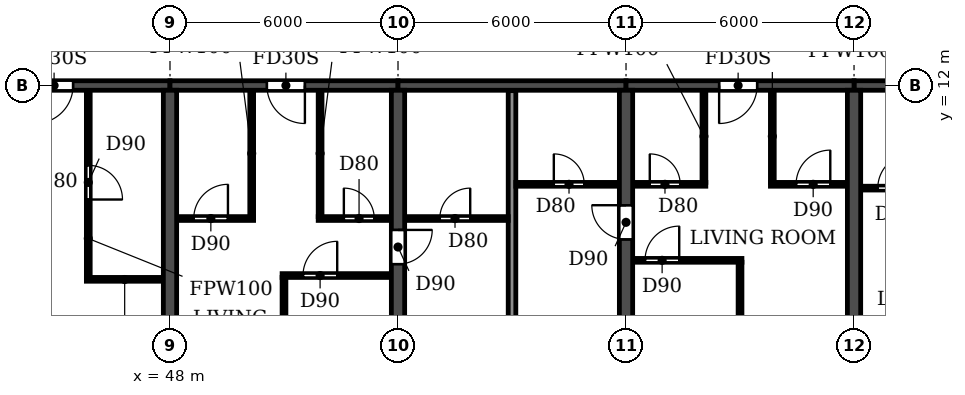
"""IFC4 building model, lengths in metres.
Left out: names, types, materials, properties, quantities, classifications, styles, units other than length and angle.
Written with IfcOpenShell. Run it as: python <this file> out.ifc"""

import sys

from ifc_helpers import new_model, si_unit, direction, frame, frame_2d, origin, place, context, subcontext, project, spatial, rectangle, extrude, element, fill, save


model = new_model("IFC4")
c1 = context("Model", 3, precision=1e-05, world=origin(), true_north=direction((0.0, 1.0)))
c2 = subcontext(c1, "Body", "Model", "MODEL_VIEW")
j1 = project(units=[si_unit("LENGTHUNIT", "METRE"), si_unit("PLANEANGLEUNIT", "RADIAN")], contexts=[c1])
p1 = place(None, origin())
s1 = spatial("IfcSite", under=j1, at=p1, CompositionType="ELEMENT")
p2 = place(p1, origin())
s2 = spatial("IfcBuilding", under=s1, at=p2, CompositionType="ELEMENT")
p3 = place(p2, frame((0.0, 0.0, 109.2)))
s3 = spatial("IfcBuildingStorey", under=s2, at=p3, CompositionType="ELEMENT", Elevation=109.2)
p4 = place(p3, frame((48.0, 0.2, 0.0), z_axis=(0.0, 0.0, 1.0), x_axis=(0.0, 1.0, 0.0)))
e1 = element("IfcWall", 1, at=p4, inside=s3, PredefinedType="SHEAR", context=c2, shape_type="SweptSolid", body=[
    extrude(rectangle(XDim=11.675, YDim=0.35, at=frame_2d((5.837, 0.0))), origin(), (0.0, 0.0, 1.0), 3.06),
])
p5 = place(p3, frame((54.0, 0.2, 0.0), z_axis=(0.0, 0.0, 1.0), x_axis=(0.0, 1.0, 0.0)))
e2 = element("IfcWall", 2, at=p5, inside=s3, PredefinedType="SHEAR", context=c2, shape_type="SweptSolid", body=[
    extrude(rectangle(XDim=11.675, YDim=0.35, at=frame_2d((5.837, 0.0))), origin(), (0.0, 0.0, 1.0), 3.06),
])
p6 = place(p5, frame((7.1, 0.0, 0.0)))
e3 = element("IfcOpeningElement", 3, at=p6, cuts=e2, PredefinedType="OPENING", context=c2, shape_type="SweptSolid", body=[
    extrude(rectangle(XDim=0.9, YDim=2.1, at=frame_2d((0.45, 1.05))), frame((0.0, 0.185, 0.0), z_axis=(0.0, -1.0, 0.0), x_axis=(1.0, 0.0, 0.0)), (0.0, 0.0, 1.0), 0.37),
])
p7 = place(p3, frame((60.0, 0.2, 0.0), z_axis=(0.0, 0.0, 1.0), x_axis=(0.0, 1.0, 0.0)))
e4 = element("IfcWall", 4, at=p7, inside=s3, PredefinedType="SHEAR", context=c2, shape_type="SweptSolid", body=[
    extrude(rectangle(XDim=11.675, YDim=0.35, at=frame_2d((5.837, 0.0))), origin(), (0.0, 0.0, 1.0), 3.06),
])
p8 = place(p7, frame((7.75, 0.0, 0.0)))
e5 = element("IfcOpeningElement", 5, at=p8, cuts=e4, PredefinedType="OPENING", context=c2, shape_type="SweptSolid", body=[
    extrude(rectangle(XDim=0.9, YDim=2.1, at=frame_2d((0.45, 1.05))), frame((0.0, 0.185, 0.0), z_axis=(0.0, -1.0, 0.0), x_axis=(1.0, 0.0, 0.0)), (0.0, 0.0, 1.0), 0.37),
])
p9 = place(p3, frame((66.0, 0.2, 0.0), z_axis=(0.0, 0.0, 1.0), x_axis=(0.0, 1.0, 0.0)))
e6 = element("IfcWall", 6, at=p9, inside=s3, PredefinedType="SHEAR", context=c2, shape_type="SweptSolid", body=[
    extrude(rectangle(XDim=11.675, YDim=0.35, at=frame_2d((5.837, 0.0))), origin(), (0.0, 0.0, 1.0), 3.06),
])
p10 = place(p3, frame((42.0, 12.0, 0.0), z_axis=(0.0, 0.0, 1.0), x_axis=(1.0, 0.0, 0.0)))
e7 = element("IfcWall", 7, at=p10, inside=s3, PredefinedType="SHEAR", context=c2, shape_type="SweptSolid", body=[
    extrude(rectangle(XDim=6.0, YDim=0.25, at=frame_2d((3.0, 0.0))), origin(), (0.0, 0.0, 1.0), 2.46),
])
p11 = place(p10, frame((2.45, 0.0, 0.0)))
e8 = element("IfcOpeningElement", 8, at=p11, cuts=e7, PredefinedType="OPENING", context=c2, shape_type="SweptSolid", body=[
    extrude(rectangle(XDim=1.0, YDim=2.1, at=frame_2d((0.5, 1.05))), frame((0.0, 0.135, 0.0), z_axis=(0.0, -1.0, 0.0), x_axis=(1.0, 0.0, 0.0)), (0.0, 0.0, 1.0), 0.27),
])
p12 = place(p3, frame((48.0, 12.0, 0.0), z_axis=(0.0, 0.0, 1.0), x_axis=(1.0, 0.0, 0.0)))
e9 = element("IfcWall", 9, at=p12, inside=s3, PredefinedType="SHEAR", context=c2, shape_type="SweptSolid", body=[
    extrude(rectangle(XDim=6.0, YDim=0.25, at=frame_2d((3.0, 0.0))), origin(), (0.0, 0.0, 1.0), 2.46),
])
p13 = place(p12, frame((2.55, 0.0, 0.0)))
e10 = element("IfcOpeningElement", 10, at=p13, cuts=e9, PredefinedType="OPENING", context=c2, shape_type="SweptSolid", body=[
    extrude(rectangle(XDim=1.0, YDim=2.1, at=frame_2d((0.5, 1.05))), frame((0.0, 0.135, 0.0), z_axis=(0.0, -1.0, 0.0), x_axis=(1.0, 0.0, 0.0)), (0.0, 0.0, 1.0), 0.27),
])
p14 = place(p3, frame((54.0, 12.0, 0.0), z_axis=(0.0, 0.0, 1.0), x_axis=(1.0, 0.0, 0.0)))
e11 = element("IfcWall", 11, at=p14, inside=s3, PredefinedType="SHEAR", context=c2, shape_type="SweptSolid", body=[
    extrude(rectangle(XDim=6.0, YDim=0.25, at=frame_2d((3.0, 0.0))), origin(), (0.0, 0.0, 1.0), 2.46),
])
p15 = place(p3, frame((60.0, 12.0, 0.0), z_axis=(0.0, 0.0, 1.0), x_axis=(1.0, 0.0, 0.0)))
e12 = element("IfcWall", 12, at=p15, inside=s3, PredefinedType="SHEAR", context=c2, shape_type="SweptSolid", body=[
    extrude(rectangle(XDim=6.0, YDim=0.25, at=frame_2d((3.0, 0.0))), origin(), (0.0, 0.0, 1.0), 2.46),
])
p16 = place(p15, frame((2.45, 0.0, 0.0)))
e13 = element("IfcOpeningElement", 13, at=p16, cuts=e12, PredefinedType="OPENING", context=c2, shape_type="SweptSolid", body=[
    extrude(rectangle(XDim=1.0, YDim=2.1, at=frame_2d((0.5, 1.05))), frame((0.0, 0.135, 0.0), z_axis=(0.0, -1.0, 0.0), x_axis=(1.0, 0.0, 0.0)), (0.0, 0.0, 1.0), 0.27),
])
p17 = place(p3, frame((66.0, 12.0, 0.0), z_axis=(0.0, 0.0, 1.0), x_axis=(1.0, 0.0, 0.0)))
e14 = element("IfcWall", 14, at=p17, inside=s3, PredefinedType="SHEAR", context=c2, shape_type="SweptSolid", body=[
    extrude(rectangle(XDim=6.0, YDim=0.25, at=frame_2d((3.0, 0.0))), origin(), (0.0, 0.0, 1.0), 2.46),
])
p18 = place(p17, frame((2.55, 0.0, 0.0)))
e15 = element("IfcOpeningElement", 15, at=p18, cuts=e14, PredefinedType="OPENING", context=c2, shape_type="SweptSolid", body=[
    extrude(rectangle(XDim=1.0, YDim=2.1, at=frame_2d((0.5, 1.05))), frame((0.0, 0.135, 0.0), z_axis=(0.0, -1.0, 0.0), x_axis=(1.0, 0.0, 0.0)), (0.0, 0.0, 1.0), 0.27),
])
p19 = place(p3, frame((57.0, 0.06, 0.0), z_axis=(0.0, 0.0, 1.0), x_axis=(0.0, 1.0, 0.0)))
e16 = element("IfcWall", 16, at=p19, inside=s3, PredefinedType="PARTITIONING", context=c2, shape_type="SweptSolid", body=[
    extrude(rectangle(XDim=11.805, YDim=0.2, at=frame_2d((5.902, 0.0))), origin(), (0.0, 0.0, 1.0), 3.06),
])
p20 = place(p3, frame((45.8, 6.9, 0.0), z_axis=(0.0, 0.0, 1.0), x_axis=(1.0, 0.0, 0.0)))
e17 = element("IfcWall", 17, at=p20, inside=s3, PredefinedType="PARTITIONING", context=c2, shape_type="SweptSolid", body=[
    extrude(rectangle(XDim=2.015, YDim=0.1, at=frame_2d((1.007, 0.0))), origin(), (0.0, 0.0, 1.0), 3.06),
])
p21 = place(p3, frame((50.95, 7.0, 0.0), z_axis=(0.0, 0.0, 1.0), x_axis=(1.0, 0.0, 0.0)))
e18 = element("IfcWall", 18, at=p21, inside=s3, PredefinedType="PARTITIONING", context=c2, shape_type="SweptSolid", body=[
    extrude(rectangle(XDim=2.865, YDim=0.1, at=frame_2d((1.433, 0.0))), origin(), (0.0, 0.0, 1.0), 3.06),
])
p22 = place(p21, frame((0.55, 0.0, 0.0)))
e19 = element("IfcOpeningElement", 19, at=p22, cuts=e18, PredefinedType="OPENING", context=c2, shape_type="SweptSolid", body=[
    extrude(rectangle(XDim=0.9, YDim=2.1, at=frame_2d((0.45, 1.05))), frame((0.0, 0.06, 0.0), z_axis=(0.0, -1.0, 0.0), x_axis=(1.0, 0.0, 0.0)), (0.0, 0.0, 1.0), 0.12),
])
p23 = place(p3, frame((60.185, 7.4, 0.0), z_axis=(0.0, 0.0, 1.0), x_axis=(1.0, 0.0, 0.0)))
e20 = element("IfcWall", 20, at=p23, inside=s3, PredefinedType="PARTITIONING", context=c2, shape_type="SweptSolid", body=[
    extrude(rectangle(XDim=2.865, YDim=0.1, at=frame_2d((1.433, 0.0))), origin(), (0.0, 0.0, 1.0), 3.06),
])
p24 = place(p23, frame((0.315, 0.0, 0.0)))
e21 = element("IfcOpeningElement", 21, at=p24, cuts=e20, PredefinedType="OPENING", context=c2, shape_type="SweptSolid", body=[
    extrude(rectangle(XDim=0.9, YDim=2.1, at=frame_2d((0.45, 1.05))), frame((0.0, 0.06, 0.0), z_axis=(0.0, -1.0, 0.0), x_axis=(1.0, 0.0, 0.0)), (0.0, 0.0, 1.0), 0.12),
])
p25 = place(p3, frame((48.185, 8.5, 0.0), z_axis=(0.0, 0.0, 1.0), x_axis=(1.0, 0.0, 0.0)))
e22 = element("IfcWall", 22, at=p25, inside=s3, PredefinedType="PARTITIONING", context=c2, shape_type="SweptSolid", body=[
    extrude(rectangle(XDim=2.015, YDim=0.1, at=frame_2d((1.007, 0.0))), origin(), (0.0, 0.0, 1.0), 3.06),
])
p26 = place(p25, frame((0.44, 0.0, 0.0)))
e23 = element("IfcOpeningElement", 23, at=p26, cuts=e22, PredefinedType="OPENING", context=c2, shape_type="SweptSolid", body=[
    extrude(rectangle(XDim=0.9, YDim=2.1, at=frame_2d((0.45, 1.05))), frame((0.0, 0.06, 0.0), z_axis=(0.0, -1.0, 0.0), x_axis=(1.0, 0.0, 0.0)), (0.0, 0.0, 1.0), 0.12),
])
p27 = place(p3, frame((51.9, 8.5, 0.0), z_axis=(0.0, 0.0, 1.0), x_axis=(1.0, 0.0, 0.0)))
e24 = element("IfcWall", 24, at=p27, inside=s3, PredefinedType="PARTITIONING", context=c2, shape_type="SweptSolid", body=[
    extrude(rectangle(XDim=1.915, YDim=0.1, at=frame_2d((0.958, 0.0))), origin(), (0.0, 0.0, 1.0), 3.06),
])
p28 = place(p27, frame((0.675, 0.0, 0.0)))
e25 = element("IfcOpeningElement", 25, at=p28, cuts=e24, PredefinedType="OPENING", context=c2, shape_type="SweptSolid", body=[
    extrude(rectangle(XDim=0.8, YDim=2.1, at=frame_2d((0.4, 1.05))), frame((0.0, 0.06, 0.0), z_axis=(0.0, -1.0, 0.0), x_axis=(1.0, 0.0, 0.0)), (0.0, 0.0, 1.0), 0.12),
])
p29 = place(p3, frame((54.185, 8.5, 0.0), z_axis=(0.0, 0.0, 1.0), x_axis=(1.0, 0.0, 0.0)))
e26 = element("IfcWall", 26, at=p29, inside=s3, PredefinedType="PARTITIONING", context=c2, shape_type="SweptSolid", body=[
    extrude(rectangle(XDim=2.715, YDim=0.1, at=frame_2d((1.357, 0.0))), origin(), (0.0, 0.0, 1.0), 3.06),
])
p30 = place(p29, frame((0.915, 0.0, 0.0)))
e27 = element("IfcOpeningElement", 27, at=p30, cuts=e26, PredefinedType="OPENING", context=c2, shape_type="SweptSolid", body=[
    extrude(rectangle(XDim=0.8, YDim=2.1, at=frame_2d((0.4, 1.05))), frame((0.0, 0.06, 0.0), z_axis=(0.0, -1.0, 0.0), x_axis=(1.0, 0.0, 0.0)), (0.0, 0.0, 1.0), 0.12),
])
p31 = place(p3, frame((66.185, 9.3, 0.0), z_axis=(0.0, 0.0, 1.0), x_axis=(1.0, 0.0, 0.0)))
e28 = element("IfcWall", 28, at=p31, inside=s3, PredefinedType="PARTITIONING", context=c2, shape_type="SweptSolid", body=[
    extrude(rectangle(XDim=2.015, YDim=0.1, at=frame_2d((1.007, 0.0))), origin(), (0.0, 0.0, 1.0), 3.06),
])
p32 = place(p31, frame((0.44, 0.0, 0.0)))
e29 = element("IfcOpeningElement", 29, at=p32, cuts=e28, PredefinedType="OPENING", context=c2, shape_type="SweptSolid", body=[
    extrude(rectangle(XDim=0.9, YDim=2.1, at=frame_2d((0.45, 1.05))), frame((0.0, 0.06, 0.0), z_axis=(0.0, -1.0, 0.0), x_axis=(1.0, 0.0, 0.0)), (0.0, 0.0, 1.0), 0.12),
])
p33 = place(p3, frame((57.1, 9.4, 0.0), z_axis=(0.0, 0.0, 1.0), x_axis=(1.0, 0.0, 0.0)))
e30 = element("IfcWall", 30, at=p33, inside=s3, PredefinedType="PARTITIONING", context=c2, shape_type="SweptSolid", body=[
    extrude(rectangle(XDim=2.715, YDim=0.1, at=frame_2d((1.357, 0.0))), origin(), (0.0, 0.0, 1.0), 3.06),
])
p34 = place(p33, frame((1.0, 0.0, 0.0)))
e31 = element("IfcOpeningElement", 31, at=p34, cuts=e30, PredefinedType="OPENING", context=c2, shape_type="SweptSolid", body=[
    extrude(rectangle(XDim=0.8, YDim=2.1, at=frame_2d((0.4, 1.05))), frame((0.0, 0.06, 0.0), z_axis=(0.0, -1.0, 0.0), x_axis=(1.0, 0.0, 0.0)), (0.0, 0.0, 1.0), 0.12),
])
p35 = place(p3, frame((60.185, 9.4, 0.0), z_axis=(0.0, 0.0, 1.0), x_axis=(1.0, 0.0, 0.0)))
e32 = element("IfcWall", 32, at=p35, inside=s3, PredefinedType="PARTITIONING", context=c2, shape_type="SweptSolid", body=[
    extrude(rectangle(XDim=1.915, YDim=0.1, at=frame_2d((0.958, 0.0))), origin(), (0.0, 0.0, 1.0), 3.06),
])
p36 = place(p35, frame((0.44, 0.0, 0.0)))
e33 = element("IfcOpeningElement", 33, at=p36, cuts=e32, PredefinedType="OPENING", context=c2, shape_type="SweptSolid", body=[
    extrude(rectangle(XDim=0.8, YDim=2.1, at=frame_2d((0.4, 1.05))), frame((0.0, 0.06, 0.0), z_axis=(0.0, -1.0, 0.0), x_axis=(1.0, 0.0, 0.0)), (0.0, 0.0, 1.0), 0.12),
])
p37 = place(p3, frame((63.8, 9.4, 0.0), z_axis=(0.0, 0.0, 1.0), x_axis=(1.0, 0.0, 0.0)))
e34 = element("IfcWall", 34, at=p37, inside=s3, PredefinedType="PARTITIONING", context=c2, shape_type="SweptSolid", body=[
    extrude(rectangle(XDim=2.015, YDim=0.1, at=frame_2d((1.007, 0.0))), origin(), (0.0, 0.0, 1.0), 3.06),
])
p38 = place(p37, frame((0.675, 0.0, 0.0)))
e35 = element("IfcOpeningElement", 35, at=p38, cuts=e34, PredefinedType="OPENING", context=c2, shape_type="SweptSolid", body=[
    extrude(rectangle(XDim=0.9, YDim=2.1, at=frame_2d((0.45, 1.05))), frame((0.0, 0.06, 0.0), z_axis=(0.0, -1.0, 0.0), x_axis=(1.0, 0.0, 0.0)), (0.0, 0.0, 1.0), 0.12),
])
p39 = place(p3, frame((45.85, 6.95, 0.0), z_axis=(0.0, 0.0, 1.0), x_axis=(0.0, 1.0, 0.0)))
e36 = element("IfcWall", 36, at=p39, inside=s3, PredefinedType="PARTITIONING", context=c2, shape_type="SweptSolid", body=[
    extrude(rectangle(XDim=4.915, YDim=0.1, at=frame_2d((2.458, 0.0))), origin(), (0.0, 0.0, 1.0), 3.06),
])
p40 = place(p39, frame((2.05, 0.0, 0.0)))
e37 = element("IfcOpeningElement", 37, at=p40, cuts=e36, PredefinedType="OPENING", context=c2, shape_type="SweptSolid", body=[
    extrude(rectangle(XDim=0.9, YDim=2.1, at=frame_2d((0.45, 1.05))), frame((0.0, 0.06, 0.0), z_axis=(0.0, -1.0, 0.0), x_axis=(1.0, 0.0, 0.0)), (0.0, 0.0, 1.0), 0.12),
])
p41 = place(p3, frame((50.15, 8.55, 0.0), z_axis=(0.0, 0.0, 1.0), x_axis=(0.0, 1.0, 0.0)))
e38 = element("IfcWall", 38, at=p41, inside=s3, PredefinedType="PARTITIONING", context=c2, shape_type="SweptSolid", body=[
    extrude(rectangle(XDim=3.315, YDim=0.1, at=frame_2d((1.657, 0.0))), origin(), (0.0, 0.0, 1.0), 3.06),
])
p42 = place(p3, frame((51.0, 0.06, 0.0), z_axis=(0.0, 0.0, 1.0), x_axis=(0.0, 1.0, 0.0)))
e39 = element("IfcWall", 39, at=p42, inside=s3, PredefinedType="PARTITIONING", context=c2, shape_type="SweptSolid", body=[
    extrude(rectangle(XDim=6.89, YDim=0.1, at=frame_2d((3.445, 0.0))), origin(), (0.0, 0.0, 1.0), 3.06),
])
p43 = place(p3, frame((51.95, 8.55, 0.0), z_axis=(0.0, 0.0, 1.0), x_axis=(0.0, 1.0, 0.0)))
e40 = element("IfcWall", 40, at=p43, inside=s3, PredefinedType="PARTITIONING", context=c2, shape_type="SweptSolid", body=[
    extrude(rectangle(XDim=3.315, YDim=0.1, at=frame_2d((1.657, 0.0))), origin(), (0.0, 0.0, 1.0), 3.06),
])
p44 = place(p3, frame((62.05, 9.45, 0.0), z_axis=(0.0, 0.0, 1.0), x_axis=(0.0, 1.0, 0.0)))
e41 = element("IfcWall", 41, at=p44, inside=s3, PredefinedType="PARTITIONING", context=c2, shape_type="SweptSolid", body=[
    extrude(rectangle(XDim=2.415, YDim=0.1, at=frame_2d((1.208, 0.0))), origin(), (0.0, 0.0, 1.0), 3.06),
])
p45 = place(p3, frame((63.0, 0.06, 0.0), z_axis=(0.0, 0.0, 1.0), x_axis=(0.0, 1.0, 0.0)))
e42 = element("IfcWall", 42, at=p45, inside=s3, PredefinedType="PARTITIONING", context=c2, shape_type="SweptSolid", body=[
    extrude(rectangle(XDim=7.29, YDim=0.1, at=frame_2d((3.645, 0.0))), origin(), (0.0, 0.0, 1.0), 3.06),
])
p46 = place(p3, frame((63.85, 9.45, 0.0), z_axis=(0.0, 0.0, 1.0), x_axis=(0.0, 1.0, 0.0)))
e43 = element("IfcWall", 43, at=p46, inside=s3, PredefinedType="PARTITIONING", context=c2, shape_type="SweptSolid", body=[
    extrude(rectangle(XDim=2.415, YDim=0.1, at=frame_2d((1.208, 0.0))), origin(), (0.0, 0.0, 1.0), 3.06),
])
p47 = place(p11, frame((1.0, 0.0, 0.0), z_axis=(0.0, 0.0, 1.0), x_axis=(-1.0, 0.0, 0.0)))
e44 = element("IfcDoor", 44, at=p47, inside=s3, OperationType="SINGLE_SWING_RIGHT", PredefinedType="DOOR", context=c2, shape_type="SweptSolid", body=[
    extrude(rectangle(XDim=1.0, YDim=2.1, at=frame_2d((0.5, 1.05))), frame((0.0, 0.025, 0.0), z_axis=(0.0, -1.0, 0.0), x_axis=(1.0, 0.0, 0.0)), (0.0, 0.0, 1.0), 0.05),
])
fill(e8, e44)
p48 = place(p40, frame((0.9, 0.0, 0.0), z_axis=(0.0, 0.0, 1.0), x_axis=(-1.0, 0.0, 0.0)))
e45 = element("IfcDoor", 45, at=p48, inside=s3, OperationType="SINGLE_SWING_RIGHT", PredefinedType="DOOR", context=c2, shape_type="SweptSolid", body=[
    extrude(rectangle(XDim=0.9, YDim=2.1, at=frame_2d((0.45, 1.05))), frame((0.0, 0.025, 0.0), z_axis=(0.0, -1.0, 0.0), x_axis=(1.0, 0.0, 0.0)), (0.0, 0.0, 1.0), 0.05),
])
fill(e37, e45)
p49 = place(p30, origin())
e46 = element("IfcDoor", 46, at=p49, inside=s3, OperationType="SINGLE_SWING_RIGHT", PredefinedType="DOOR", context=c2, shape_type="SweptSolid", body=[
    extrude(rectangle(XDim=0.8, YDim=2.1, at=frame_2d((0.4, 1.05))), frame((0.0, 0.025, 0.0), z_axis=(0.0, -1.0, 0.0), x_axis=(1.0, 0.0, 0.0)), (0.0, 0.0, 1.0), 0.05),
])
fill(e27, e46)
p50 = place(p26, origin())
e47 = element("IfcDoor", 47, at=p50, inside=s3, OperationType="SINGLE_SWING_RIGHT", PredefinedType="DOOR", context=c2, shape_type="SweptSolid", body=[
    extrude(rectangle(XDim=0.9, YDim=2.1, at=frame_2d((0.45, 1.05))), frame((0.0, 0.025, 0.0), z_axis=(0.0, -1.0, 0.0), x_axis=(1.0, 0.0, 0.0)), (0.0, 0.0, 1.0), 0.05),
])
fill(e23, e47)
p51 = place(p13, frame((1.0, 0.0, 0.0), z_axis=(0.0, 0.0, 1.0), x_axis=(-1.0, 0.0, 0.0)))
e48 = element("IfcDoor", 48, at=p51, inside=s3, OperationType="SINGLE_SWING_LEFT", PredefinedType="DOOR", context=c2, shape_type="SweptSolid", body=[
    extrude(rectangle(XDim=1.0, YDim=2.1, at=frame_2d((0.5, 1.05))), frame((0.0, 0.025, 0.0), z_axis=(0.0, -1.0, 0.0), x_axis=(1.0, 0.0, 0.0)), (0.0, 0.0, 1.0), 0.05),
])
fill(e10, e48)
p52 = place(p22, origin())
e49 = element("IfcDoor", 49, at=p52, inside=s3, OperationType="SINGLE_SWING_RIGHT", PredefinedType="DOOR", context=c2, shape_type="SweptSolid", body=[
    extrude(rectangle(XDim=0.9, YDim=2.1, at=frame_2d((0.45, 1.05))), frame((0.0, 0.025, 0.0), z_axis=(0.0, -1.0, 0.0), x_axis=(1.0, 0.0, 0.0)), (0.0, 0.0, 1.0), 0.05),
])
fill(e19, e49)
p53 = place(p28, origin())
e50 = element("IfcDoor", 50, at=p53, inside=s3, OperationType="SINGLE_SWING_LEFT", PredefinedType="DOOR", context=c2, shape_type="SweptSolid", body=[
    extrude(rectangle(XDim=0.8, YDim=2.1, at=frame_2d((0.4, 1.05))), frame((0.0, 0.025, 0.0), z_axis=(0.0, -1.0, 0.0), x_axis=(1.0, 0.0, 0.0)), (0.0, 0.0, 1.0), 0.05),
])
fill(e25, e50)
p54 = place(p6, frame((0.9, 0.0, 0.0), z_axis=(0.0, 0.0, 1.0), x_axis=(-1.0, 0.0, 0.0)))
e51 = element("IfcDoor", 51, at=p54, inside=s3, OperationType="SINGLE_SWING_LEFT", PredefinedType="DOOR", context=c2, shape_type="SweptSolid", body=[
    extrude(rectangle(XDim=0.9, YDim=2.1, at=frame_2d((0.45, 1.05))), frame((0.0, 0.025, 0.0), z_axis=(0.0, -1.0, 0.0), x_axis=(1.0, 0.0, 0.0)), (0.0, 0.0, 1.0), 0.05),
])
fill(e3, e51)
p55 = place(p34, origin())
e52 = element("IfcDoor", 52, at=p55, inside=s3, OperationType="SINGLE_SWING_LEFT", PredefinedType="DOOR", context=c2, shape_type="SweptSolid", body=[
    extrude(rectangle(XDim=0.8, YDim=2.1, at=frame_2d((0.4, 1.05))), frame((0.0, 0.025, 0.0), z_axis=(0.0, -1.0, 0.0), x_axis=(1.0, 0.0, 0.0)), (0.0, 0.0, 1.0), 0.05),
])
fill(e31, e52)
p56 = place(p8, origin())
e53 = element("IfcDoor", 53, at=p56, inside=s3, OperationType="SINGLE_SWING_RIGHT", PredefinedType="DOOR", context=c2, shape_type="SweptSolid", body=[
    extrude(rectangle(XDim=0.9, YDim=2.1, at=frame_2d((0.45, 1.05))), frame((0.0, 0.025, 0.0), z_axis=(0.0, -1.0, 0.0), x_axis=(1.0, 0.0, 0.0)), (0.0, 0.0, 1.0), 0.05),
])
fill(e5, e53)
p57 = place(p24, origin())
e54 = element("IfcDoor", 54, at=p57, inside=s3, OperationType="SINGLE_SWING_RIGHT", PredefinedType="DOOR", context=c2, shape_type="SweptSolid", body=[
    extrude(rectangle(XDim=0.9, YDim=2.1, at=frame_2d((0.45, 1.05))), frame((0.0, 0.025, 0.0), z_axis=(0.0, -1.0, 0.0), x_axis=(1.0, 0.0, 0.0)), (0.0, 0.0, 1.0), 0.05),
])
fill(e21, e54)
p58 = place(p36, origin())
e55 = element("IfcDoor", 55, at=p58, inside=s3, OperationType="SINGLE_SWING_LEFT", PredefinedType="DOOR", context=c2, shape_type="SweptSolid", body=[
    extrude(rectangle(XDim=0.8, YDim=2.1, at=frame_2d((0.4, 1.05))), frame((0.0, 0.025, 0.0), z_axis=(0.0, -1.0, 0.0), x_axis=(1.0, 0.0, 0.0)), (0.0, 0.0, 1.0), 0.05),
])
fill(e33, e55)
p59 = place(p16, frame((1.0, 0.0, 0.0), z_axis=(0.0, 0.0, 1.0), x_axis=(-1.0, 0.0, 0.0)))
e56 = element("IfcDoor", 56, at=p59, inside=s3, OperationType="SINGLE_SWING_RIGHT", PredefinedType="DOOR", context=c2, shape_type="SweptSolid", body=[
    extrude(rectangle(XDim=1.0, YDim=2.1, at=frame_2d((0.5, 1.05))), frame((0.0, 0.025, 0.0), z_axis=(0.0, -1.0, 0.0), x_axis=(1.0, 0.0, 0.0)), (0.0, 0.0, 1.0), 0.05),
])
fill(e13, e56)
p60 = place(p38, origin())
e57 = element("IfcDoor", 57, at=p60, inside=s3, OperationType="SINGLE_SWING_RIGHT", PredefinedType="DOOR", context=c2, shape_type="SweptSolid", body=[
    extrude(rectangle(XDim=0.9, YDim=2.1, at=frame_2d((0.45, 1.05))), frame((0.0, 0.025, 0.0), z_axis=(0.0, -1.0, 0.0), x_axis=(1.0, 0.0, 0.0)), (0.0, 0.0, 1.0), 0.05),
])
fill(e35, e57)
p61 = place(p32, origin())
e58 = element("IfcDoor", 58, at=p61, inside=s3, OperationType="SINGLE_SWING_RIGHT", PredefinedType="DOOR", context=c2, shape_type="SweptSolid", body=[
    extrude(rectangle(XDim=0.9, YDim=2.1, at=frame_2d((0.45, 1.05))), frame((0.0, 0.025, 0.0), z_axis=(0.0, -1.0, 0.0), x_axis=(1.0, 0.0, 0.0)), (0.0, 0.0, 1.0), 0.05),
])
fill(e29, e58)
save(model, sys.argv[1])
